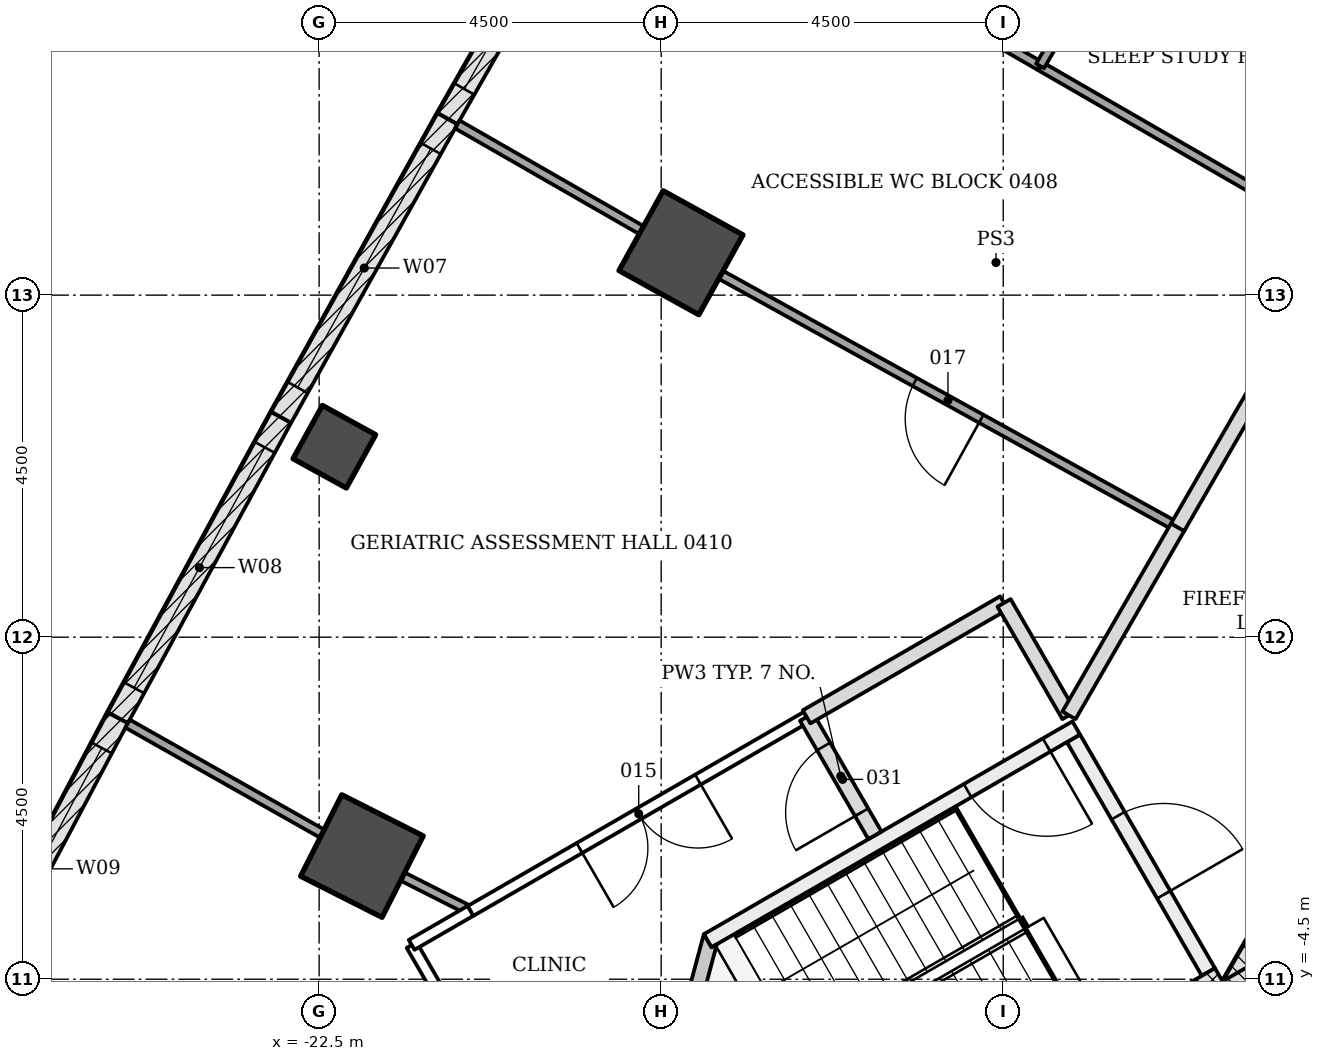
"""IFC4 building model, lengths in metres.
Left out: names, types, materials, properties, quantities, classifications, styles, units other than length and angle.
Written with IfcOpenShell. Run it as: python <this file> out.ifc"""

import sys

from ifc_helpers import new_model, si_unit, direction, frame, frame_2d, origin, origin_2d, place, context, subcontext, project, spatial, polyline, rectangle, outline, extrude, element, fill, save


model = new_model("IFC4")
c1 = context("Model", 3, precision=1e-05, world=origin(), true_north=direction((0.0, 1.0)))
c2 = subcontext(c1, "Body", "Model", "MODEL_VIEW")
j1 = project(units=[si_unit("LENGTHUNIT", "METRE"), si_unit("PLANEANGLEUNIT", "RADIAN")], contexts=[c1])
p1 = place(None, origin())
s1 = spatial("IfcSite", under=j1, at=p1, CompositionType="ELEMENT")
p2 = place(p1, origin())
s2 = spatial("IfcBuilding", under=s1, at=p2, CompositionType="ELEMENT")
p3 = place(p2, frame((0.0, 0.0, 19.5)))
s3 = spatial("IfcBuildingStorey", under=s2, at=p3, CompositionType="ELEMENT", Elevation=19.5)
for number, where, z_axis, x_axis in (
    (1, (-17.739, 5.058, -0.25), (0.0, 0.0, 1.0), (-0.875, 0.484, 0.0)),
    (2, (-21.937, -2.88, -0.25), (0.0, 0.0, 1.0), (-0.893, 0.451, 0.0)),
):
    element("IfcColumn", number, at=place(p3, frame(where, z_axis=z_axis, x_axis=x_axis)), inside=s3, PredefinedType="COLUMN", context=c2, shape_type="SweptSolid", body=[
        extrude(rectangle(XDim=1.2, YDim=1.2, at=origin_2d()), origin(), (0.0, 0.0, 1.0), 4.55),
    ])
p4 = place(p3, frame((-22.3, 2.506, -0.25), z_axis=(0.0, 0.0, 1.0), x_axis=(-0.87611131274, 0.482108875348, 0.0)))
e3 = element("IfcColumn", 3, at=p4, inside=s3, PredefinedType="COLUMN", context=c2, shape_type="SweptSolid", body=[
    extrude(rectangle(XDim=0.8, YDim=0.8, at=origin_2d()), origin(), (0.0, 0.0, 1.0), 4.55),
])
p5 = place(p3, frame((-1.083, 11.281, -0.25), z_axis=(0.0, 0.0, 1.0), x_axis=(-0.500001446645, -0.866024568562, 0.0)))
e4 = element("IfcWall", 4, at=p5, inside=s3, PredefinedType="SHEAR", context=c2, shape_type="SweptSolid", body=[
    extrude(rectangle(XDim=18.458, YDim=0.7, at=frame_2d((9.229, 0.0))), origin(), (0.0, 0.0, 1.0), 4.55),
])
p6 = place(p5, frame((8.979, 0.0, 0.25)))
e5 = element("IfcOpeningElement", 5, at=p6, cuts=e4, PredefinedType="OPENING", context=c2, shape_type="SweptSolid", body=[
    extrude(rectangle(XDim=1.2, YDim=2.1, at=frame_2d((0.6, 1.05))), frame((0.0, 0.36, 0.0), z_axis=(0.0, -1.0, 0.0), x_axis=(1.0, 0.0, 0.0)), (0.0, 0.0, 1.0), 0.72),
])
p7 = place(p5, frame((11.029, 0.0, 0.25)))
e6 = element("IfcOpeningElement", 6, at=p7, cuts=e4, PredefinedType="OPENING", context=c2, shape_type="SweptSolid", body=[
    extrude(rectangle(XDim=1.2, YDim=2.1, at=frame_2d((0.6, 1.05))), frame((0.0, 0.36, 0.0), z_axis=(0.0, -1.0, 0.0), x_axis=(1.0, 0.0, 0.0)), (0.0, 0.0, 1.0), 0.72),
])
p8 = place(p3, frame((-10.311, -4.353, -0.25), z_axis=(0.0, 0.0, 1.0), x_axis=(0.500042739161, -0.866000726912, 0.0)))
e7 = element("IfcWall", 7, at=p8, inside=s3, PredefinedType="SHEAR", context=c2, shape_type="SweptSolid", body=[
    extrude(rectangle(XDim=2.771, YDim=0.7, at=frame_2d((1.386, 0.0))), origin(), (0.0, 0.0, 1.0), 4.55),
])
p9 = place(p3, frame((-20.811, 6.823, 0.0), z_axis=(0.0, 0.0, 1.0), x_axis=(0.495524760411, 0.868593812907, 0.0)))
e8 = element("IfcWall", 8, at=p9, inside=s3, PredefinedType="NOTDEFINED", context=c2, shape_type="SweptSolid", body=[
    extrude(rectangle(XDim=4.496, YDim=0.3, at=frame_2d((2.248, 0.0))), origin(), (0.0, 0.0, 1.0), 4.3),
])
p10 = place(p9, frame((0.448, 0.0, 1.5)))
e9 = element("IfcOpeningElement", 9, at=p10, cuts=e8, PredefinedType="OPENING", context=c2, shape_type="SweptSolid", body=[
    extrude(rectangle(XDim=3.6, YDim=1.8, at=frame_2d((1.8, 0.9))), frame((0.0, 0.16, 0.0), z_axis=(0.0, -1.0, 0.0), x_axis=(1.0, 0.0, 0.0)), (0.0, 0.0, 1.0), 0.32),
])
p11 = place(p3, frame((-23.0, 2.893, 0.0), z_axis=(0.0, 0.0, 1.0), x_axis=(0.486606252415, 0.873621402617, 0.0)))
e10 = element("IfcWall", 10, at=p11, inside=s3, PredefinedType="NOTDEFINED", context=c2, shape_type="SweptSolid", body=[
    extrude(rectangle(XDim=4.496, YDim=0.3, at=frame_2d((2.248, 0.0))), origin(), (0.0, 0.0, 1.0), 4.3),
])
p12 = place(p11, frame((0.448, 0.0, 1.5)))
e11 = element("IfcOpeningElement", 11, at=p12, cuts=e10, PredefinedType="OPENING", context=c2, shape_type="SweptSolid", body=[
    extrude(rectangle(XDim=3.6, YDim=1.8, at=frame_2d((1.8, 0.9))), frame((0.0, 0.16, 0.0), z_axis=(0.0, -1.0, 0.0), x_axis=(1.0, 0.0, 0.0)), (0.0, 0.0, 1.0), 0.32),
])
p13 = place(p3, frame((-25.148, -1.06, 0.0), z_axis=(0.0, 0.0, 1.0), x_axis=(0.477577109439, 0.878589838628, 0.0)))
e12 = element("IfcWall", 12, at=p13, inside=s3, PredefinedType="NOTDEFINED", context=c2, shape_type="SweptSolid", body=[
    extrude(rectangle(XDim=4.496, YDim=0.3, at=frame_2d((2.248, 0.0))), origin(), (0.0, 0.0, 1.0), 4.3),
])
p14 = place(p13, frame((0.448, 0.0, 1.5)))
e13 = element("IfcOpeningElement", 13, at=p14, cuts=e12, PredefinedType="OPENING", context=c2, shape_type="SweptSolid", body=[
    extrude(rectangle(XDim=3.6, YDim=1.8, at=frame_2d((1.8, 0.9))), frame((0.0, 0.16, 0.0), z_axis=(0.0, -1.0, 0.0), x_axis=(1.0, 0.0, 0.0)), (0.0, 0.0, 1.0), 0.32),
])
p15 = place(p3, frame((-27.256, -5.034, 0.0), z_axis=(0.0, 0.0, 1.0), x_axis=(0.468566202388, 0.883428386447, 0.0)))
e14 = element("IfcWall", 14, at=p15, inside=s3, PredefinedType="NOTDEFINED", context=c2, shape_type="SweptSolid", body=[
    extrude(rectangle(XDim=4.496, YDim=0.3, at=frame_2d((2.248, 0.0))), origin(), (0.0, 0.0, 1.0), 4.3),
])
p16 = place(p15, frame((0.448, 0.0, 1.5)))
e15 = element("IfcOpeningElement", 15, at=p16, cuts=e14, PredefinedType="OPENING", context=c2, shape_type="SweptSolid", body=[
    extrude(rectangle(XDim=3.6, YDim=1.8, at=frame_2d((1.8, 0.9))), frame((0.0, 0.16, 0.0), z_axis=(0.0, -1.0, 0.0), x_axis=(1.0, 0.0, 0.0)), (0.0, 0.0, 1.0), 0.32),
])
p17 = place(p3, frame((-12.576, -1.331, -0.25), z_axis=(0.0, 0.0, 1.0), x_axis=(0.499970499736, -0.8660424351, 0.0)))
e16 = element("IfcWall", 16, at=p17, inside=s3, PredefinedType="SHEAR", context=c2, shape_type="SweptSolid", body=[
    extrude(rectangle(XDim=3.55, YDim=0.2, at=frame_2d((1.775, 0.0))), origin(), (0.0, 0.0, 1.0), 4.55),
])
p18 = place(p17, frame((1.175, 0.0, 0.25)))
e17 = element("IfcOpeningElement", 17, at=p18, cuts=e16, PredefinedType="OPENING", context=c2, shape_type="SweptSolid", body=[
    extrude(rectangle(XDim=1.2, YDim=2.1, at=frame_2d((0.6, 1.05))), frame((0.0, 0.11, 0.0), z_axis=(0.0, -1.0, 0.0), x_axis=(1.0, 0.0, 0.0)), (0.0, 0.0, 1.0), 0.22),
])
p19 = place(p3, frame((-12.539, -1.194, -0.25), z_axis=(0.0, 0.0, 1.0), x_axis=(-0.866045472092, -0.499965239061, 0.0)))
e18 = element("IfcWall", 18, at=p19, inside=s3, PredefinedType="SHEAR", context=c2, shape_type="SweptSolid", body=[
    extrude(rectangle(XDim=5.6, YDim=0.2, at=frame_2d((2.8, 0.0))), origin(), (0.0, 0.0, 1.0), 4.55),
])
p20 = place(p19, frame((0.45, 0.0, 0.25)))
e19 = element("IfcOpeningElement", 19, at=p20, cuts=e18, PredefinedType="OPENING", context=c2, shape_type="SweptSolid", body=[
    extrude(rectangle(XDim=1.2, YDim=2.1, at=frame_2d((0.6, 1.05))), frame((0.0, 0.11, 0.0), z_axis=(0.0, -1.0, 0.0), x_axis=(1.0, 0.0, 0.0)), (0.0, 0.0, 1.0), 0.22),
])
p21 = place(p3, frame((-10.43, -4.847, -0.25), z_axis=(0.0, 0.0, 1.0), x_axis=(-0.866018442252, -0.500012057535, 0.0)))
e20 = element("IfcWall", 20, at=p21, inside=s3, PredefinedType="SHEAR", context=c2, shape_type="SweptSolid", body=[
    extrude(rectangle(XDim=7.2, YDim=1.136, at=frame_2d((3.6, 0.0))), origin(), (0.0, 0.0, 1.0), 4.55),
])
p22 = place(p3, frame((0.0, 0.0, -0.25)))
e21 = element("IfcWall", 21, at=p22, inside=s3, PredefinedType="SHEAR", context=c2, shape_type="SweptSolid", body=[
    extrude(outline(polyline([(-17.439, -3.907), (-18.025, -6.093), (-16.95, -7.955), (-16.777, -7.855), (-17.81, -6.065), (-17.267, -4.039), (-17.339, -4.081), (-17.339, -4.081), (-17.339, -4.081), (-17.339, -4.081), (-17.339, -4.081), (-17.339, -4.081), (-17.339, -4.081), (-17.339, -4.081), (-17.339, -4.081), (-17.339, -4.081), (-17.339, -4.081), (-17.339, -4.081), (-17.339, -4.081), (-17.339, -4.081), (-17.339, -4.081), (-17.339, -4.081), (-17.339, -4.081), (-17.439, -3.907)])), origin(), (0.0, 0.0, 1.0), 4.55),
])
p23 = place(p3, frame((-17.941, -9.838, 0.0), z_axis=(0.0, 0.0, 1.0), x_axis=(-0.500048140185, 0.865997608252, 0.0)))
e22 = element("IfcWall", 22, at=p23, inside=s3, PredefinedType="PARTITIONING", context=c2, shape_type="SweptSolid", body=[
    extrude(rectangle(XDim=6.683, YDim=0.15, at=frame_2d((3.342, 0.0))), origin(), (0.0, 0.0, 1.0), 3.843),
])
p24 = place(p23, frame((2.45, 0.0, 0.0)))
e23 = element("IfcOpeningElement", 23, at=p24, cuts=e22, PredefinedType="OPENING", context=c2, shape_type="SweptSolid", body=[
    extrude(rectangle(XDim=1.8, YDim=2.1, at=frame_2d((0.9, 1.05))), frame((0.0, 0.085, 0.0), z_axis=(0.0, -1.0, 0.0), x_axis=(1.0, 0.0, 0.0)), (0.0, 0.0, 1.0), 0.17),
])
p25 = place(p3, frame((-21.283, -4.048, 0.0), z_axis=(0.0, 0.0, 1.0), x_axis=(0.865804825377, 0.500381858538, 0.0)))
e24 = element("IfcWall", 24, at=p25, inside=s3, PredefinedType="PARTITIONING", context=c2, shape_type="SweptSolid", body=[
    extrude(rectangle(XDim=0.897, YDim=0.15, at=frame_2d((0.449, 0.0))), origin(), (0.0, 0.0, 1.0), 3.894),
])
p26 = place(p3, frame((-22.461, -2.584, 0.0), z_axis=(0.0, 0.0, 1.0), x_axis=(-0.870620069476, 0.491955988505, 0.0)))
e25 = element("IfcWall", 25, at=p26, inside=s3, PredefinedType="PARTITIONING", context=c2, shape_type="SweptSolid", body=[
    extrude(rectangle(XDim=2.939, YDim=0.12, at=frame_2d((1.47, 0.0))), origin(), (0.0, 0.0, 1.0), 3.683),
])
p27 = place(p3, frame((-20.509, -3.601, 0.0), z_axis=(0.0, 0.0, 1.0), x_axis=(-0.892316605155, 0.451410097544, 0.0)))
e26 = element("IfcWall", 26, at=p27, inside=s3, PredefinedType="PARTITIONING", context=c2, shape_type="SweptSolid", body=[
    extrude(rectangle(XDim=1.0, YDim=0.12, at=frame_2d((0.5, 0.0))), origin(), (0.0, 0.0, 1.0), 3.894),
])
p28 = place(p3, frame((-16.087, -1.049, 0.0), z_axis=(0.0, 0.0, 1.0), x_axis=(-0.866071706002, -0.49991979363, 0.0)))
e27 = element("IfcWall", 27, at=p28, inside=s3, PredefinedType="PARTITIONING", context=c2, shape_type="SweptSolid", body=[
    extrude(rectangle(XDim=5.105, YDim=0.15, at=frame_2d((2.552, 0.0))), origin(), (0.0, 0.0, 1.0), 3.894),
])
p29 = place(p28, frame((1.65, 0.0, 0.0)))
e28 = element("IfcOpeningElement", 28, at=p29, cuts=e27, PredefinedType="OPENING", context=c2, shape_type="SweptSolid", body=[
    extrude(rectangle(XDim=1.8, YDim=2.1, at=frame_2d((0.9, 1.05))), frame((0.0, 0.085, 0.0), z_axis=(0.0, -1.0, 0.0), x_axis=(1.0, 0.0, 0.0)), (0.0, 0.0, 1.0), 0.17),
])
p30 = place(p3, frame((-15.188, -2.607, 0.0), z_axis=(0.0, 0.0, 1.0), x_axis=(-0.500024172624, 0.866011447264, 0.0)))
e29 = element("IfcWall", 29, at=p30, inside=s3, PredefinedType="PARTITIONING", context=c2, shape_type="SweptSolid", body=[
    extrude(rectangle(XDim=1.798, YDim=0.2, at=frame_2d((0.899, 0.0))), origin(), (0.0, 0.0, 1.0), 4.3),
])
p31 = place(p30, frame((0.35, 0.0, 0.0)))
e30 = element("IfcOpeningElement", 30, at=p31, cuts=e29, PredefinedType="OPENING", context=c2, shape_type="SweptSolid", body=[
    extrude(rectangle(XDim=1.0, YDim=2.1, at=frame_2d((0.5, 1.05))), frame((0.0, 0.11, 0.0), z_axis=(0.0, -1.0, 0.0), x_axis=(1.0, 0.0, 0.0)), (0.0, 0.0, 1.0), 0.22),
])
p32 = place(p3, frame((-16.087, -1.048, 0.0), z_axis=(0.0, 0.0, 1.0), x_axis=(0.865988915629, 0.500063194015, 0.0)))
e31 = element("IfcWall", 31, at=p32, inside=s3, PredefinedType="PARTITIONING", context=c2, shape_type="SweptSolid", body=[
    extrude(rectangle(XDim=2.998, YDim=0.2, at=frame_2d((1.499, 0.0))), origin(), (0.0, 0.0, 1.0), 3.843),
])
p33 = place(p3, frame((-13.489, 0.451, 0.0), z_axis=(0.0, 0.0, 1.0), x_axis=(0.500044178772, -0.865999895656, 0.0)))
e32 = element("IfcWall", 32, at=p33, inside=s3, PredefinedType="PARTITIONING", context=c2, shape_type="SweptSolid", body=[
    extrude(rectangle(XDim=1.708, YDim=0.2, at=frame_2d((0.854, 0.0))), origin(), (0.0, 0.0, 1.0), 4.3),
])
p34 = place(p3, frame((-12.635, -1.028, 0.0), z_axis=(0.0, 0.0, 1.0), x_axis=(0.50005725472, 0.865992345233, 0.0)))
e33 = element("IfcWall", 33, at=p34, inside=s3, PredefinedType="PARTITIONING", context=c2, shape_type="SweptSolid", body=[
    extrude(rectangle(XDim=2.862, YDim=0.2, at=frame_2d((1.431, 0.0))), origin(), (0.0, 0.0, 1.0), 3.698),
])
p35 = place(p3, frame((-18.26, 5.356, 0.0), z_axis=(0.0, 0.0, 1.0), x_axis=(-0.867283853893, 0.49781393791, 0.0)))
e34 = element("IfcWall", 34, at=p35, inside=s3, PredefinedType="PARTITIONING", context=c2, shape_type="SweptSolid", body=[
    extrude(rectangle(XDim=2.792, YDim=0.12, at=frame_2d((1.396, 0.0))), origin(), (0.0, 0.0, 1.0), 3.683),
])
p36 = place(p3, frame((-11.208, 1.446, 0.0), z_axis=(0.0, 0.0, 1.0), x_axis=(-0.875125393946, 0.483896212912, 0.0)))
e35 = element("IfcWall", 35, at=p36, inside=s3, PredefinedType="PARTITIONING", context=c2, shape_type="SweptSolid", body=[
    extrude(rectangle(XDim=6.863, YDim=0.12, at=frame_2d((3.432, 0.0))), origin(), (0.0, 0.0, 1.0), 3.698),
])
p37 = place(p36, frame((2.95, 0.0, 0.0)))
e36 = element("IfcOpeningElement", 36, at=p37, cuts=e35, PredefinedType="OPENING", context=c2, shape_type="SweptSolid", body=[
    extrude(rectangle(XDim=1.0, YDim=2.1, at=frame_2d((0.5, 1.05))), frame((0.0, 0.07, 0.0), z_axis=(0.0, -1.0, 0.0), x_axis=(1.0, 0.0, 0.0)), (0.0, 0.0, 1.0), 0.14),
])
p38 = place(p3, frame((-9.031, 5.213, 0.0), z_axis=(0.0, 0.0, 1.0), x_axis=(-0.500044734646, -0.865999574684, 0.0)))
e37 = element("IfcWall", 37, at=p38, inside=s3, PredefinedType="PARTITIONING", context=c2, shape_type="SweptSolid", body=[
    extrude(rectangle(XDim=4.35, YDim=0.2, at=frame_2d((2.175, 0.0))), origin(), (0.0, 0.0, 1.0), 3.688),
])
p39 = place(p3, frame((-9.032, 5.214, 0.0), z_axis=(0.0, 0.0, 1.0), x_axis=(-0.866038805516, 0.499976786802, 0.0)))
e38 = element("IfcWall", 38, at=p39, inside=s3, PredefinedType="PARTITIONING", context=c2, shape_type="SweptSolid", body=[
    extrude(rectangle(XDim=4.598, YDim=0.12, at=frame_2d((2.299, 0.0))), origin(), (0.0, 0.0, 1.0), 3.688),
])
p40 = place(p3, frame((-13.017, 7.515, 0.0), z_axis=(0.0, 0.0, 1.0), x_axis=(-0.866023771128, 0.500002827834, 0.0)))
e39 = element("IfcWall", 39, at=p40, inside=s3, PredefinedType="PARTITIONING", context=c2, shape_type="SweptSolid", body=[
    extrude(rectangle(XDim=5.226, YDim=0.12, at=frame_2d((2.613, 0.0))), origin(), (0.0, 0.0, 1.0), 3.18),
])
p41 = place(p3, frame((-10.797, 11.355, 0.0), z_axis=(0.0, 0.0, 1.0), x_axis=(-0.500117989508, -0.865957271793, 0.0)))
e40 = element("IfcWall", 40, at=p41, inside=s3, PredefinedType="PARTITIONING", context=c2, shape_type="SweptSolid", body=[
    extrude(rectangle(XDim=4.435, YDim=0.12, at=frame_2d((2.217, 0.0))), origin(), (0.0, 0.0, 1.0), 3.688),
])
p42 = place(p41, frame((1.75, 0.0, 0.0)))
e41 = element("IfcOpeningElement", 41, at=p42, cuts=e40, PredefinedType="OPENING", context=c2, shape_type="SweptSolid", body=[
    extrude(rectangle(XDim=1.0, YDim=2.1, at=frame_2d((0.5, 1.05))), frame((0.0, 0.07, 0.0), z_axis=(0.0, -1.0, 0.0), x_axis=(1.0, 0.0, 0.0)), (0.0, 0.0, 1.0), 0.14),
])
p43 = place(p10, origin())
e42 = element("IfcWindow", 42, at=p43, inside=s3, PartitioningType="SINGLE_PANEL", PredefinedType="WINDOW", context=c2, shape_type="SweptSolid", body=[
    extrude(rectangle(XDim=3.6, YDim=1.8, at=frame_2d((1.8, 0.9))), frame((0.0, 0.03, 0.0), z_axis=(0.0, -1.0, 0.0), x_axis=(1.0, 0.0, 0.0)), (0.0, 0.0, 1.0), 0.06),
])
fill(e9, e42)
p44 = place(p12, origin())
e43 = element("IfcWindow", 43, at=p44, inside=s3, PartitioningType="SINGLE_PANEL", PredefinedType="WINDOW", context=c2, shape_type="SweptSolid", body=[
    extrude(rectangle(XDim=3.6, YDim=1.8, at=frame_2d((1.8, 0.9))), frame((0.0, 0.03, 0.0), z_axis=(0.0, -1.0, 0.0), x_axis=(1.0, 0.0, 0.0)), (0.0, 0.0, 1.0), 0.06),
])
fill(e11, e43)
p45 = place(p14, origin())
e44 = element("IfcWindow", 44, at=p45, inside=s3, PartitioningType="SINGLE_PANEL", PredefinedType="WINDOW", context=c2, shape_type="SweptSolid", body=[
    extrude(rectangle(XDim=3.6, YDim=1.8, at=frame_2d((1.8, 0.9))), frame((0.0, 0.03, 0.0), z_axis=(0.0, -1.0, 0.0), x_axis=(1.0, 0.0, 0.0)), (0.0, 0.0, 1.0), 0.06),
])
fill(e13, e44)
p46 = place(p16, origin())
e45 = element("IfcWindow", 45, at=p46, inside=s3, PartitioningType="SINGLE_PANEL", PredefinedType="WINDOW", context=c2, shape_type="SweptSolid", body=[
    extrude(rectangle(XDim=3.6, YDim=1.8, at=frame_2d((1.8, 0.9))), frame((0.0, 0.03, 0.0), z_axis=(0.0, -1.0, 0.0), x_axis=(1.0, 0.0, 0.0)), (0.0, 0.0, 1.0), 0.06),
])
fill(e15, e45)
p47 = place(p18, origin())
e46 = element("IfcDoor", 46, at=p47, inside=s3, OperationType="SINGLE_SWING_RIGHT", PredefinedType="DOOR", context=c2, shape_type="SweptSolid", body=[
    extrude(rectangle(XDim=1.2, YDim=2.1, at=frame_2d((0.6, 1.05))), frame((0.0, 0.025, 0.0), z_axis=(0.0, -1.0, 0.0), x_axis=(1.0, 0.0, 0.0)), (0.0, 0.0, 1.0), 0.05),
])
fill(e17, e46)
p48 = place(p20, origin())
e47 = element("IfcDoor", 47, at=p48, inside=s3, OperationType="SINGLE_SWING_LEFT", PredefinedType="DOOR", context=c2, shape_type="SweptSolid", body=[
    extrude(rectangle(XDim=1.2, YDim=2.1, at=frame_2d((0.6, 1.05))), frame((0.0, 0.025, 0.0), z_axis=(0.0, -1.0, 0.0), x_axis=(1.0, 0.0, 0.0)), (0.0, 0.0, 1.0), 0.05),
])
fill(e19, e47)
p49 = place(p29, origin())
e48 = element("IfcDoor", 48, at=p49, inside=s3, OperationType="DOUBLE_DOOR_SINGLE_SWING", PredefinedType="DOOR", context=c2, shape_type="SweptSolid", body=[
    extrude(rectangle(XDim=1.8, YDim=2.1, at=frame_2d((0.9, 1.05))), frame((0.0, 0.025, 0.0), z_axis=(0.0, -1.0, 0.0), x_axis=(1.0, 0.0, 0.0)), (0.0, 0.0, 1.0), 0.05),
])
fill(e28, e48)
p50 = place(p37, origin())
e49 = element("IfcDoor", 49, at=p50, inside=s3, OperationType="SINGLE_SWING_LEFT", PredefinedType="DOOR", context=c2, shape_type="SweptSolid", body=[
    extrude(rectangle(XDim=1.0, YDim=2.1, at=frame_2d((0.5, 1.05))), frame((0.0, 0.025, 0.0), z_axis=(0.0, -1.0, 0.0), x_axis=(1.0, 0.0, 0.0)), (0.0, 0.0, 1.0), 0.05),
])
fill(e36, e49)
p51 = place(p31, origin())
e50 = element("IfcDoor", 50, at=p51, inside=s3, OperationType="SINGLE_SWING_LEFT", PredefinedType="DOOR", context=c2, shape_type="SweptSolid", body=[
    extrude(rectangle(XDim=1.0, YDim=2.1, at=frame_2d((0.5, 1.05))), frame((0.0, 0.025, 0.0), z_axis=(0.0, -1.0, 0.0), x_axis=(1.0, 0.0, 0.0)), (0.0, 0.0, 1.0), 0.05),
])
fill(e30, e50)
save(model, sys.argv[1])
